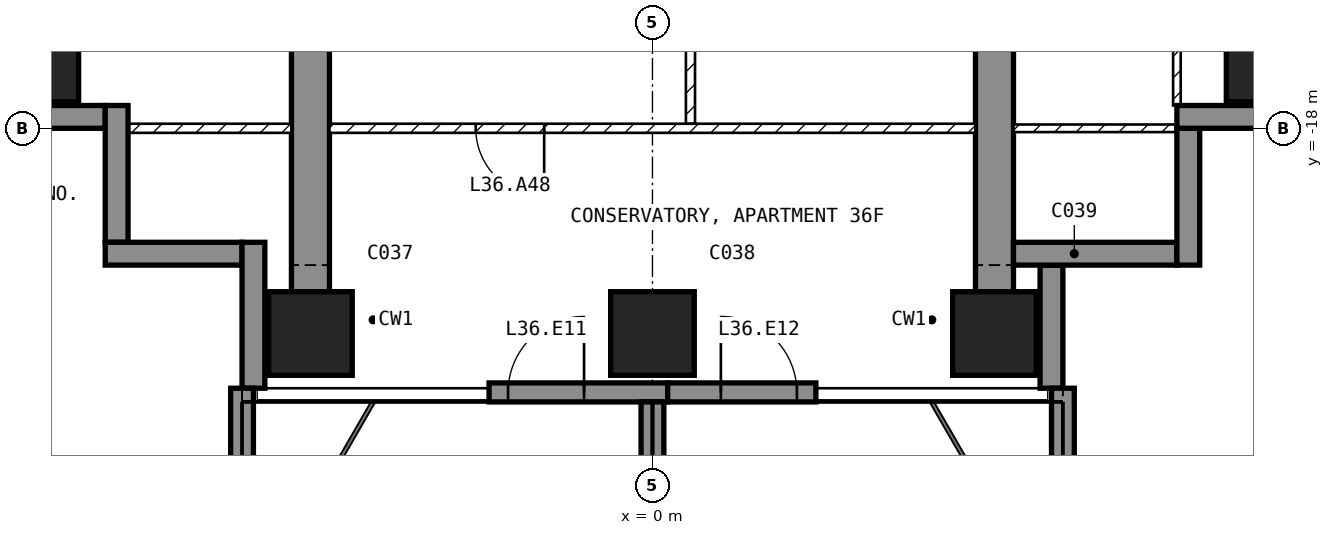
"""IFC4 building model, lengths in metres.
Left out: names, types, materials, properties, quantities, classifications, styles, units other than length and angle.
Written with IfcOpenShell. Run it as: python <this file> out.ifc"""

import sys

from ifc_helpers import new_model, si_unit, direction, frame, frame_2d, origin, origin_2d, place, context, subcontext, project, spatial, polyline, rectangle, outline, extrude, element, fill, save


model = new_model("IFC4")
c1 = context("Model", 3, precision=1e-05, world=origin(), true_north=direction((0.0, 1.0)))
c2 = subcontext(c1, "Body", "Model", "MODEL_VIEW")
j1 = project(units=[si_unit("LENGTHUNIT", "METRE"), si_unit("PLANEANGLEUNIT", "RADIAN")], contexts=[c1])
p1 = place(None, origin())
s1 = spatial("IfcSite", under=j1, at=p1, CompositionType="ELEMENT")
p2 = place(p1, origin())
s2 = spatial("IfcBuilding", under=s1, at=p2, CompositionType="ELEMENT")
p3 = place(p2, frame((0.0, 0.0, 147.9)))
s3 = spatial("IfcBuildingStorey", under=s2, at=p3, CompositionType="ELEMENT", Elevation=147.9)
for number, where, z_axis, x_axis in (
    (1, (-8.1, -17.1, -0.25), (0.0, 0.0, 1.0), (1.0, 0.0, 0.0)),
    (2, (-4.5, -20.7, -0.25), (0.0, 0.0, 1.0), (1.0, 0.0, 0.0)),
    (3, (0.0, -20.7, -0.25), (0.0, 0.0, 1.0), (1.0, 0.0, 0.0)),
    (4, (4.5, -20.7, -0.25), (0.0, 0.0, 1.0), (1.0, 0.0, 0.0)),
    (5, (8.1, -17.1, -0.25), (0.0, 0.0, 1.0), (1.0, 0.0, 0.0)),
):
    element("IfcColumn", number, at=place(p3, frame(where, z_axis=z_axis, x_axis=x_axis)), inside=s3, PredefinedType="COLUMN", context=c2, shape_type="SweptSolid", body=[
        extrude(rectangle(XDim=1.1, YDim=1.1, at=origin_2d()), origin(), (0.0, 0.0, 1.0), 3.5),
    ])
for number, where, z_axis, x_axis in (
    (6, (-4.75, -20.15, -0.25), (1.0, 0.0, 0.0), (0.0, 1.0, 0.0)),
    (7, (4.25, -20.15, -0.25), (1.0, 0.0, 0.0), (0.0, 1.0, 0.0)),
):
    element("IfcWall", number, at=place(p3, frame(where, z_axis=z_axis, x_axis=x_axis)), inside=s3, PredefinedType="SHEAR", context=c2, shape_type="SweptSolid", body=[
        extrude(outline(polyline([(0.0, 0.0), (6.65, 0.0), (6.65, 2.65), (9.05, 2.65), (9.05, 0.0), (11.15, 0.0), (11.15, 3.5), (0.0, 3.5), (0.0, 0.0)])), origin(), (0.0, 0.0, 1.0), 0.5),
    ])
p4 = place(p3, frame((-2.15, -21.475, 0.0), z_axis=(0.0, 0.0, 1.0), x_axis=(1.0, 0.0, 0.0)))
e8 = element("IfcWall", 8, at=p4, inside=s3, PredefinedType="SOLIDWALL", context=c2, shape_type="SweptSolid", body=[
    extrude(rectangle(XDim=2.35, YDim=0.25, at=frame_2d((1.175, 0.0))), origin(), (0.0, 0.0, 1.0), 3.25),
])
p5 = place(p4, frame((0.25, 0.0, 0.0)))
e9 = element("IfcOpeningElement", 9, at=p5, cuts=e8, PredefinedType="OPENING", context=c2, shape_type="SweptSolid", body=[
    extrude(rectangle(XDim=1.0, YDim=2.4, at=frame_2d((0.5, 1.2))), frame((0.0, 0.135, 0.0), z_axis=(0.0, -1.0, 0.0), x_axis=(1.0, 0.0, 0.0)), (0.0, 0.0, 1.0), 0.27),
])
p6 = place(p3, frame((0.2, -21.475, 0.0), z_axis=(0.0, 0.0, 1.0), x_axis=(1.0, 0.0, 0.0)))
e10 = element("IfcWall", 10, at=p6, inside=s3, PredefinedType="SOLIDWALL", context=c2, shape_type="SweptSolid", body=[
    extrude(rectangle(XDim=1.95, YDim=0.25, at=frame_2d((0.975, 0.0))), origin(), (0.0, 0.0, 1.0), 3.25),
])
p7 = place(p6, frame((0.7, 0.0, 0.0)))
e11 = element("IfcOpeningElement", 11, at=p7, cuts=e10, PredefinedType="OPENING", context=c2, shape_type="SweptSolid", body=[
    extrude(rectangle(XDim=1.0, YDim=2.4, at=frame_2d((0.5, 1.2))), frame((0.0, 0.135, 0.0), z_axis=(0.0, -1.0, 0.0), x_axis=(1.0, 0.0, 0.0)), (0.0, 0.0, 1.0), 0.27),
])
p8 = place(p3, frame((5.25, -21.42, 0.0), z_axis=(0.0, 0.0, 1.0), x_axis=(0.0, 1.0, 0.0)))
e12 = element("IfcWall", 12, at=p8, inside=s3, PredefinedType="SOLIDWALL", context=c2, shape_type="SweptSolid", body=[
    extrude(rectangle(XDim=1.62, YDim=0.3, at=frame_2d((0.81, 0.0))), origin(), (0.0, 0.0, 1.0), 3.25),
])
p9 = place(p3, frame((4.75, -19.65, 0.0), z_axis=(0.0, 0.0, 1.0), x_axis=(1.0, 0.0, 0.0)))
e13 = element("IfcWall", 13, at=p9, inside=s3, PredefinedType="SOLIDWALL", context=c2, shape_type="SweptSolid", body=[
    extrude(rectangle(XDim=2.15, YDim=0.3, at=frame_2d((1.075, 0.0))), origin(), (0.0, 0.0, 1.0), 3.25),
])
p10 = place(p3, frame((7.05, -19.8, 0.0), z_axis=(0.0, 0.0, 1.0), x_axis=(0.0, 1.0, 0.0)))
e14 = element("IfcWall", 14, at=p10, inside=s3, PredefinedType="SOLIDWALL", context=c2, shape_type="SweptSolid", body=[
    extrude(rectangle(XDim=1.8, YDim=0.3, at=frame_2d((0.9, 0.0))), origin(), (0.0, 0.0, 1.0), 3.25),
])
p11 = place(p3, frame((6.9, -17.85, 0.0), z_axis=(0.0, 0.0, 1.0), x_axis=(1.0, 0.0, 0.0)))
e15 = element("IfcWall", 15, at=p11, inside=s3, PredefinedType="SOLIDWALL", context=c2, shape_type="SweptSolid", body=[
    extrude(rectangle(XDim=1.85, YDim=0.3, at=frame_2d((0.925, 0.0))), origin(), (0.0, 0.0, 1.0), 3.25),
])
p12 = place(p3, frame((-8.75, -17.85, 0.0), z_axis=(0.0, 0.0, 1.0), x_axis=(1.0, 0.0, 0.0)))
e16 = element("IfcWall", 16, at=p12, inside=s3, PredefinedType="SOLIDWALL", context=c2, shape_type="SweptSolid", body=[
    extrude(rectangle(XDim=1.55, YDim=0.3, at=frame_2d((0.775, 0.0))), origin(), (0.0, 0.0, 1.0), 3.25),
])
for number, where, z_axis, x_axis in (
    (17, (-7.05, -17.7, 0.0), (0.0, 0.0, 1.0), (0.0, -1.0, 0.0)),
    (18, (-7.2, -19.65, 0.0), (0.0, 0.0, 1.0), (1.0, 0.0, 0.0)),
):
    element("IfcWall", number, at=place(p3, frame(where, z_axis=z_axis, x_axis=x_axis)), inside=s3, PredefinedType="SOLIDWALL", context=c2, shape_type="SweptSolid", body=[
        extrude(rectangle(XDim=1.8, YDim=0.3, at=frame_2d((0.9, 0.0))), origin(), (0.0, 0.0, 1.0), 3.25),
    ])
p13 = place(p3, frame((-5.25, -19.5, 0.0), z_axis=(0.0, 0.0, 1.0), x_axis=(0.0, -1.0, 0.0)))
e19 = element("IfcWall", 19, at=p13, inside=s3, PredefinedType="SOLIDWALL", context=c2, shape_type="SweptSolid", body=[
    extrude(rectangle(XDim=1.92, YDim=0.3, at=frame_2d((0.96, 0.0))), origin(), (0.0, 0.0, 1.0), 3.25),
])
p14 = place(p3, frame((-5.4, -21.42, 0.0), z_axis=(0.0, 0.0, 1.0), x_axis=(0.0, -1.0, 0.0)))
e20 = element("IfcWall", 20, at=p14, inside=s3, PredefinedType="SOLIDWALL", context=c2, shape_type="SweptSolid", body=[
    extrude(rectangle(XDim=2.88, YDim=0.3, at=frame_2d((1.44, 0.0))), origin(), (0.0, 0.0, 1.0), 3.25),
])
p15 = place(p3, frame((0.0, -21.6, 0.0), z_axis=(0.0, 0.0, 1.0), x_axis=(0.0, -1.0, 0.0)))
e21 = element("IfcWall", 21, at=p15, inside=s3, PredefinedType="SOLIDWALL", context=c2, shape_type="SweptSolid", body=[
    extrude(rectangle(XDim=2.7, YDim=0.3, at=frame_2d((1.35, 0.0))), origin(), (0.0, 0.0, 1.0), 3.25),
])
p16 = place(p3, frame((5.4, -21.42, 0.0), z_axis=(0.0, 0.0, 1.0), x_axis=(0.0, -1.0, 0.0)))
e22 = element("IfcWall", 22, at=p16, inside=s3, PredefinedType="SOLIDWALL", context=c2, shape_type="SweptSolid", body=[
    extrude(rectangle(XDim=2.88, YDim=0.3, at=frame_2d((1.44, 0.0))), origin(), (0.0, 0.0, 1.0), 3.25),
])
p17 = place(p3, frame((0.5, -15.06, 0.0), z_axis=(0.0, 0.0, 1.0), x_axis=(0.0, -1.0, 0.0)))
e23 = element("IfcWall", 23, at=p17, inside=s3, PredefinedType="PARTITIONING", context=c2, shape_type="SweptSolid", body=[
    extrude(rectangle(XDim=2.88, YDim=0.12, at=frame_2d((1.44, 0.0))), origin(), (0.0, 0.0, 1.0), 3.25),
])
p18 = place(p3, frame((4.25, -18.0, 0.0), z_axis=(0.0, 0.0, 1.0), x_axis=(-1.0, 0.0, 0.0)))
e24 = element("IfcWall", 24, at=p18, inside=s3, PredefinedType="PARTITIONING", context=c2, shape_type="SweptSolid", body=[
    extrude(rectangle(XDim=8.5, YDim=0.12, at=frame_2d((4.25, 0.0))), origin(), (0.0, 0.0, 1.0), 3.25),
])
p19 = place(p18, frame((5.675, 0.0, 0.0)))
e25 = element("IfcOpeningElement", 25, at=p19, cuts=e24, PredefinedType="OPENING", context=c2, shape_type="SweptSolid", body=[
    extrude(rectangle(XDim=0.9, YDim=2.1, at=frame_2d((0.45, 1.05))), frame((0.0, 0.07, 0.0), z_axis=(0.0, -1.0, 0.0), x_axis=(1.0, 0.0, 0.0)), (0.0, 0.0, 1.0), 0.14),
])
p20 = place(p3, frame((6.9, -17.7, 0.0), z_axis=(0.0, 0.0, 1.0), x_axis=(0.0, 1.0, 0.0)))
e26 = element("IfcWall", 26, at=p20, inside=s3, PredefinedType="PARTITIONING", context=c2, shape_type="SweptSolid", body=[
    extrude(rectangle(XDim=3.25, YDim=0.1, at=frame_2d((1.625, 0.0))), origin(), (0.0, 0.0, 1.0), 3.25),
])
p21 = place(p20, frame((2.2, 0.0, 0.0)))
e27 = element("IfcOpeningElement", 27, at=p21, cuts=e26, PredefinedType="OPENING", context=c2, shape_type="SweptSolid", body=[
    extrude(rectangle(XDim=0.85, YDim=2.1, at=frame_2d((0.425, 1.05))), frame((0.0, 0.06, 0.0), z_axis=(0.0, -1.0, 0.0), x_axis=(1.0, 0.0, 0.0)), (0.0, 0.0, 1.0), 0.12),
])
p22 = place(p3, frame((7.12, -18.0, 0.0), z_axis=(0.0, 0.0, 1.0), x_axis=(-1.0, 0.0, 0.0)))
e28 = element("IfcWall", 28, at=p22, inside=s3, PredefinedType="PARTITIONING", context=c2, shape_type="SweptSolid", body=[
    extrude(rectangle(XDim=2.37, YDim=0.1, at=frame_2d((1.185, 0.0))), origin(), (0.0, 0.0, 1.0), 3.25),
])
p23 = place(p3, frame((-4.75, -18.0, 0.0), z_axis=(0.0, 0.0, 1.0), x_axis=(-1.0, 0.0, 0.0)))
e29 = element("IfcWall", 29, at=p23, inside=s3, PredefinedType="PARTITIONING", context=c2, shape_type="SweptSolid", body=[
    extrude(rectangle(XDim=2.37, YDim=0.12, at=frame_2d((1.185, 0.0))), origin(), (0.0, 0.0, 1.0), 3.25),
])
p24 = place(p5, origin())
e30 = element("IfcDoor", 30, at=p24, inside=s3, OperationType="SINGLE_SWING_RIGHT", PredefinedType="DOOR", context=c2, shape_type="SweptSolid", body=[
    extrude(rectangle(XDim=1.0, YDim=2.4, at=frame_2d((0.5, 1.2))), frame((0.0, 0.025, 0.0), z_axis=(0.0, -1.0, 0.0), x_axis=(1.0, 0.0, 0.0)), (0.0, 0.0, 1.0), 0.05),
])
fill(e9, e30)
p25 = place(p7, origin())
e31 = element("IfcDoor", 31, at=p25, inside=s3, OperationType="SINGLE_SWING_LEFT", PredefinedType="DOOR", context=c2, shape_type="SweptSolid", body=[
    extrude(rectangle(XDim=1.0, YDim=2.4, at=frame_2d((0.5, 1.2))), frame((0.0, 0.025, 0.0), z_axis=(0.0, -1.0, 0.0), x_axis=(1.0, 0.0, 0.0)), (0.0, 0.0, 1.0), 0.05),
])
fill(e11, e31)
p26 = place(p19, origin())
e32 = element("IfcDoor", 32, at=p26, inside=s3, OperationType="SINGLE_SWING_LEFT", PredefinedType="DOOR", context=c2, shape_type="SweptSolid", body=[
    extrude(rectangle(XDim=0.9, YDim=2.1, at=frame_2d((0.45, 1.05))), frame((0.0, 0.025, 0.0), z_axis=(0.0, -1.0, 0.0), x_axis=(1.0, 0.0, 0.0)), (0.0, 0.0, 1.0), 0.05),
])
fill(e25, e32)
save(model, sys.argv[1])
